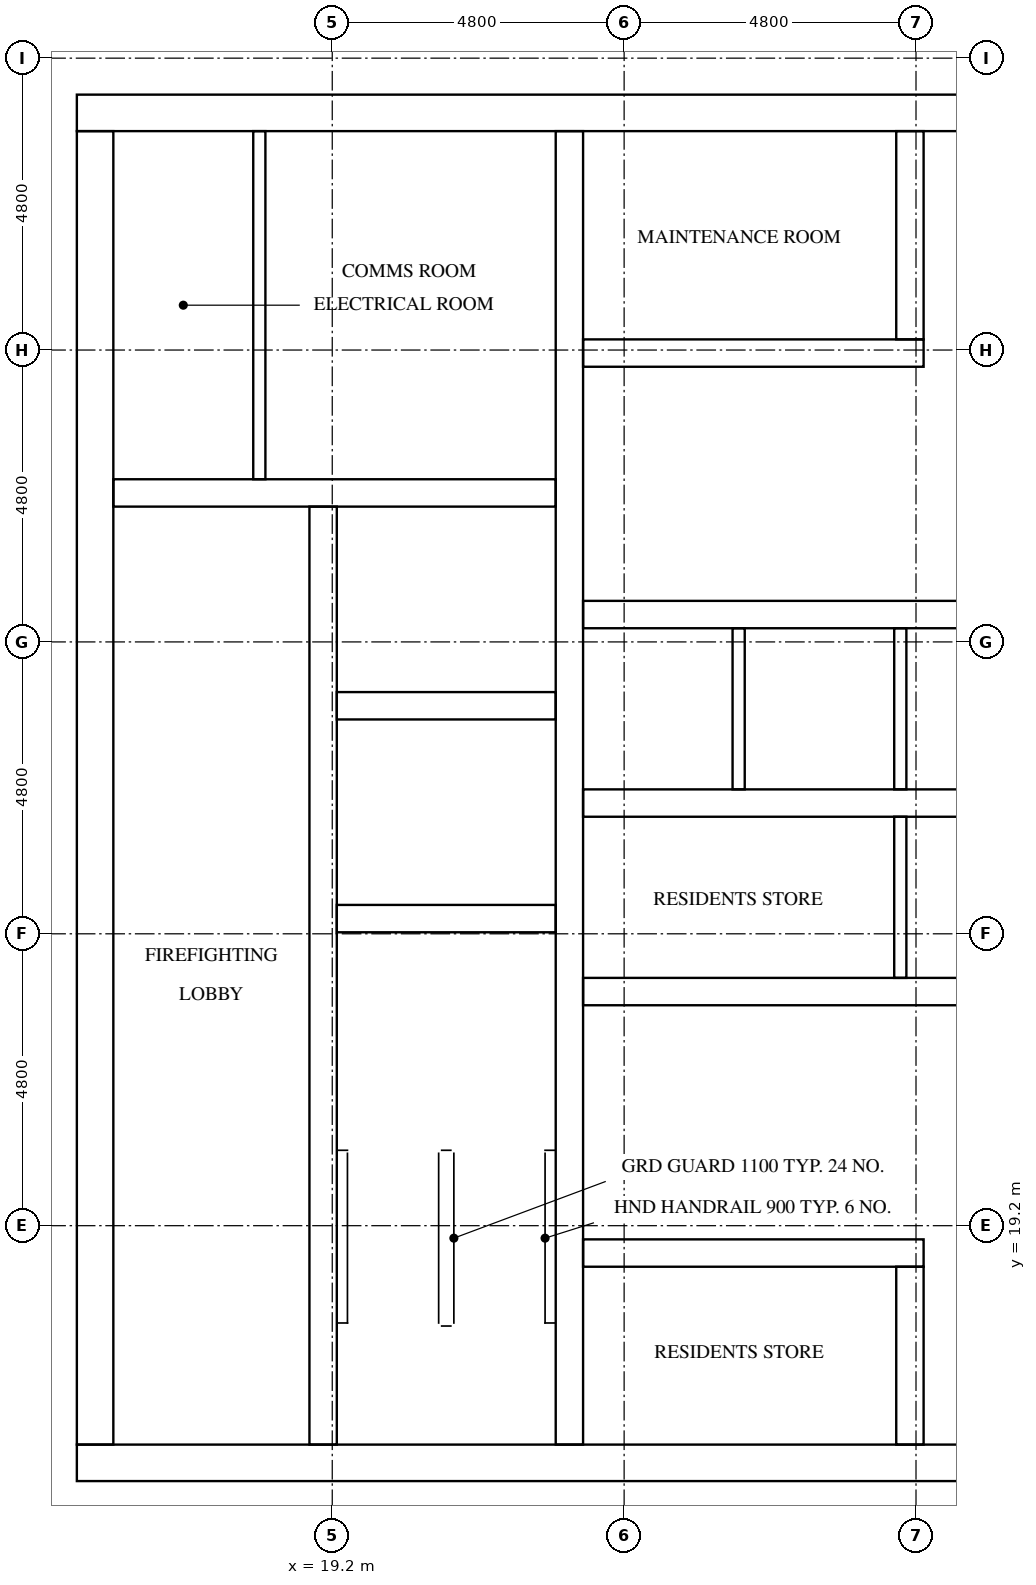
"""IFC4 building model, lengths in metres.
Left out: names, types, materials, properties, quantities, classifications, styles, units other than length and angle.
Written with IfcOpenShell. Run it as: python <this file> out.ifc"""

import sys

from ifc_helpers import new_model, si_unit, direction, frame, frame_2d, origin, place, context, subcontext, project, spatial, rectangle, extrude, element, fill, save


model = new_model("IFC4")
c1 = context("Model", 3, precision=1e-05, world=origin(), true_north=direction((0.0, 1.0)))
c2 = subcontext(c1, "Body", "Model", "MODEL_VIEW")
j1 = project(units=[si_unit("LENGTHUNIT", "METRE"), si_unit("PLANEANGLEUNIT", "RADIAN")], contexts=[c1])
p1 = place(None, origin())
s1 = spatial("IfcSite", under=j1, at=p1, CompositionType="ELEMENT")
p2 = place(p1, origin())
s2 = spatial("IfcBuilding", under=s1, at=p2, CompositionType="ELEMENT")
p3 = place(p2, frame((0.0, 0.0, 242.2)))
s3 = spatial("IfcBuildingStorey", under=s2, at=p3, CompositionType="ELEMENT", Elevation=242.2)
p4 = place(p3, frame((15.0, 15.3, 0.0), z_axis=(0.0, 0.0, 1.0), x_axis=(1.0, 0.0, 0.0)))
e1 = element("IfcWall", 1, at=p4, inside=s3, PredefinedType="SHEAR", context=c2, shape_type="SweptSolid", body=[
    extrude(rectangle(XDim=32.4, YDim=0.6, at=frame_2d((16.2, 0.0))), origin(), (0.0, 0.0, 1.0), 3.2),
])
p5 = place(p4, frame((15.3, 0.0, 0.0)))
e2 = element("IfcOpeningElement", 2, at=p5, cuts=e1, PredefinedType="OPENING", context=c2, shape_type="SweptSolid", body=[
    extrude(rectangle(XDim=1.8, YDim=2.1, at=frame_2d((0.9, 1.05))), frame((0.0, 0.31, 0.0), z_axis=(0.0, -1.0, 0.0), x_axis=(1.0, 0.0, 0.0)), (0.0, 0.0, 1.0), 0.62),
])
p6 = place(p3, frame((15.0, 37.5, 0.0), z_axis=(0.0, 0.0, 1.0), x_axis=(1.0, 0.0, 0.0)))
e3 = element("IfcWall", 3, at=p6, inside=s3, PredefinedType="SHEAR", context=c2, shape_type="SweptSolid", body=[
    extrude(rectangle(XDim=32.4, YDim=0.6, at=frame_2d((16.2, 0.0))), origin(), (0.0, 0.0, 1.0), 3.2),
])
p7 = place(p6, frame((15.3, 0.0, 0.0)))
e4 = element("IfcOpeningElement", 4, at=p7, cuts=e3, PredefinedType="OPENING", context=c2, shape_type="SweptSolid", body=[
    extrude(rectangle(XDim=1.8, YDim=2.1, at=frame_2d((0.9, 1.05))), frame((0.0, 0.31, 0.0), z_axis=(0.0, -1.0, 0.0), x_axis=(1.0, 0.0, 0.0)), (0.0, 0.0, 1.0), 0.62),
])
p8 = place(p6, frame((1.25, 0.0, 0.0)))
e5 = element("IfcOpeningElement", 5, at=p8, cuts=e3, PredefinedType="OPENING", context=c2, shape_type="SweptSolid", body=[
    extrude(rectangle(XDim=1.0, YDim=2.1, at=frame_2d((0.5, 1.05))), frame((0.0, 0.31, 0.0), z_axis=(0.0, -1.0, 0.0), x_axis=(1.0, 0.0, 0.0)), (0.0, 0.0, 1.0), 0.62),
])
p9 = place(p6, frame((4.988, 0.0, 0.0)))
e6 = element("IfcOpeningElement", 6, at=p9, cuts=e3, PredefinedType="OPENING", context=c2, shape_type="SweptSolid", body=[
    extrude(rectangle(XDim=1.0, YDim=2.1, at=frame_2d((0.5, 1.05))), frame((0.0, 0.31, 0.0), z_axis=(0.0, -1.0, 0.0), x_axis=(1.0, 0.0, 0.0)), (0.0, 0.0, 1.0), 0.62),
])
p10 = place(p3, frame((15.3, 15.6, 0.0), z_axis=(0.0, 0.0, 1.0), x_axis=(0.0, 1.0, 0.0)))
e7 = element("IfcWall", 7, at=p10, inside=s3, PredefinedType="SHEAR", context=c2, shape_type="SweptSolid", body=[
    extrude(rectangle(XDim=21.6, YDim=0.6, at=frame_2d((10.8, 0.0))), origin(), (0.0, 0.0, 1.0), 3.2),
])
p11 = place(p10, frame((5.16, 0.0, 0.0)))
e8 = element("IfcOpeningElement", 8, at=p11, cuts=e7, PredefinedType="OPENING", context=c2, shape_type="SweptSolid", body=[
    extrude(rectangle(XDim=1.2, YDim=2.1, at=frame_2d((0.6, 1.05))), frame((0.0, 0.31, 0.0), z_axis=(0.0, -1.0, 0.0), x_axis=(1.0, 0.0, 0.0)), (0.0, 0.0, 1.0), 0.62),
])
p12 = place(p3, frame((19.05, 15.6, 0.0), z_axis=(0.0, 0.0, 1.0), x_axis=(0.0, 1.0, 0.0)))
e9 = element("IfcWall", 9, at=p12, inside=s3, PredefinedType="SHEAR", context=c2, shape_type="SweptSolid", body=[
    extrude(rectangle(XDim=15.425, YDim=0.45, at=frame_2d((7.712, 0.0))), origin(), (0.0, 0.0, 1.0), 3.2),
])
p13 = place(p12, frame((9.85, 0.0, 0.0)))
e10 = element("IfcOpeningElement", 10, at=p13, cuts=e9, PredefinedType="OPENING", context=c2, shape_type="SweptSolid", body=[
    extrude(rectangle(XDim=1.1, YDim=2.1, at=frame_2d((0.55, 1.05))), frame((0.0, 0.235, 0.0), z_axis=(0.0, -1.0, 0.0), x_axis=(1.0, 0.0, 0.0)), (0.0, 0.0, 1.0), 0.47),
])
p14 = place(p12, frame((13.35, 0.0, 0.0)))
e11 = element("IfcOpeningElement", 11, at=p14, cuts=e9, PredefinedType="OPENING", context=c2, shape_type="SweptSolid", body=[
    extrude(rectangle(XDim=1.1, YDim=2.1, at=frame_2d((0.55, 1.05))), frame((0.0, 0.235, 0.0), z_axis=(0.0, -1.0, 0.0), x_axis=(1.0, 0.0, 0.0)), (0.0, 0.0, 1.0), 0.47),
])
p15 = place(p12, frame((0.6, 0.0, 0.0)))
e12 = element("IfcOpeningElement", 12, at=p15, cuts=e9, PredefinedType="OPENING", context=c2, shape_type="SweptSolid", body=[
    extrude(rectangle(XDim=1.2, YDim=2.1, at=frame_2d((0.6, 1.05))), frame((0.0, 0.235, 0.0), z_axis=(0.0, -1.0, 0.0), x_axis=(1.0, 0.0, 0.0)), (0.0, 0.0, 1.0), 0.47),
])
p16 = place(p3, frame((23.1, 15.6, 0.0), z_axis=(0.0, 0.0, 1.0), x_axis=(0.0, 1.0, 0.0)))
e13 = element("IfcWall", 13, at=p16, inside=s3, PredefinedType="SHEAR", context=c2, shape_type="SweptSolid", body=[
    extrude(rectangle(XDim=21.6, YDim=0.45, at=frame_2d((10.8, 0.0))), origin(), (0.0, 0.0, 1.0), 3.2),
])
for number, where, z_axis, x_axis in (
    (14, (19.275, 24.25, 0.0), (0.0, 0.0, 1.0), (1.0, 0.0, 0.0)),
    (15, (19.275, 27.75, 0.0), (0.0, 0.0, 1.0), (1.0, 0.0, 0.0)),
):
    element("IfcWall", number, at=place(p3, frame(where, z_axis=z_axis, x_axis=x_axis)), inside=s3, PredefinedType="SHEAR", context=c2, shape_type="SweptSolid", body=[
        extrude(rectangle(XDim=3.6, YDim=0.45, at=frame_2d((1.8, 0.0))), origin(), (0.0, 0.0, 1.0), 3.2),
    ])
p17 = place(p3, frame((15.6, 31.25, 0.0), z_axis=(0.0, 0.0, 1.0), x_axis=(1.0, 0.0, 0.0)))
e16 = element("IfcWall", 16, at=p17, inside=s3, PredefinedType="SHEAR", context=c2, shape_type="SweptSolid", body=[
    extrude(rectangle(XDim=7.275, YDim=0.45, at=frame_2d((3.637, 0.0))), origin(), (0.0, 0.0, 1.0), 3.2),
])
p18 = place(p3, frame((23.325, 18.75, 0.0), z_axis=(0.0, 0.0, 1.0), x_axis=(1.0, 0.0, 0.0)))
e17 = element("IfcWall", 17, at=p18, inside=s3, PredefinedType="SHEAR", context=c2, shape_type="SweptSolid", body=[
    extrude(rectangle(XDim=5.6, YDim=0.45, at=frame_2d((2.8, 0.0))), origin(), (0.0, 0.0, 1.0), 3.2),
])
p19 = place(p18, frame((2.075, 0.0, 0.0)))
e18 = element("IfcOpeningElement", 18, at=p19, cuts=e17, PredefinedType="OPENING", context=c2, shape_type="SweptSolid", body=[
    extrude(rectangle(XDim=1.0, YDim=2.1, at=frame_2d((0.5, 1.05))), frame((0.0, 0.235, 0.0), z_axis=(0.0, -1.0, 0.0), x_axis=(1.0, 0.0, 0.0)), (0.0, 0.0, 1.0), 0.47),
])
p20 = place(p3, frame((23.325, 23.05, 0.0), z_axis=(0.0, 0.0, 1.0), x_axis=(1.0, 0.0, 0.0)))
e19 = element("IfcWall", 19, at=p20, inside=s3, PredefinedType="SHEAR", context=c2, shape_type="SweptSolid", body=[
    extrude(rectangle(XDim=15.75, YDim=0.45, at=frame_2d((7.875, 0.0))), origin(), (0.0, 0.0, 1.0), 3.2),
])
p21 = place(p20, frame((2.058, 0.0, 0.0)))
e20 = element("IfcOpeningElement", 20, at=p21, cuts=e19, PredefinedType="OPENING", context=c2, shape_type="SweptSolid", body=[
    extrude(rectangle(XDim=1.0, YDim=2.1, at=frame_2d((0.5, 1.05))), frame((0.0, 0.235, 0.0), z_axis=(0.0, -1.0, 0.0), x_axis=(1.0, 0.0, 0.0)), (0.0, 0.0, 1.0), 0.47),
])
p22 = place(p20, frame((12.692, 0.0, 0.0)))
e21 = element("IfcOpeningElement", 21, at=p22, cuts=e19, PredefinedType="OPENING", context=c2, shape_type="SweptSolid", body=[
    extrude(rectangle(XDim=1.0, YDim=2.1, at=frame_2d((0.5, 1.05))), frame((0.0, 0.235, 0.0), z_axis=(0.0, -1.0, 0.0), x_axis=(1.0, 0.0, 0.0)), (0.0, 0.0, 1.0), 0.47),
])
p23 = place(p3, frame((23.325, 26.15, 0.0), z_axis=(0.0, 0.0, 1.0), x_axis=(1.0, 0.0, 0.0)))
e22 = element("IfcWall", 22, at=p23, inside=s3, PredefinedType="SHEAR", context=c2, shape_type="SweptSolid", body=[
    extrude(rectangle(XDim=15.75, YDim=0.45, at=frame_2d((7.875, 0.0))), origin(), (0.0, 0.0, 1.0), 3.2),
])
p24 = place(p3, frame((23.325, 29.25, 0.0), z_axis=(0.0, 0.0, 1.0), x_axis=(1.0, 0.0, 0.0)))
e23 = element("IfcWall", 23, at=p24, inside=s3, PredefinedType="SHEAR", context=c2, shape_type="SweptSolid", body=[
    extrude(rectangle(XDim=15.75, YDim=0.45, at=frame_2d((7.875, 0.0))), origin(), (0.0, 0.0, 1.0), 3.2),
])
p25 = place(p24, frame((0.679, 0.0, 0.0)))
e24 = element("IfcOpeningElement", 24, at=p25, cuts=e23, PredefinedType="OPENING", context=c2, shape_type="SweptSolid", body=[
    extrude(rectangle(XDim=1.1, YDim=2.1, at=frame_2d((0.55, 1.05))), frame((0.0, 0.235, 0.0), z_axis=(0.0, -1.0, 0.0), x_axis=(1.0, 0.0, 0.0)), (0.0, 0.0, 1.0), 0.47),
])
p26 = place(p24, frame((3.337, 0.0, 0.0)))
e25 = element("IfcOpeningElement", 25, at=p26, cuts=e23, PredefinedType="OPENING", context=c2, shape_type="SweptSolid", body=[
    extrude(rectangle(XDim=1.1, YDim=2.1, at=frame_2d((0.55, 1.05))), frame((0.0, 0.235, 0.0), z_axis=(0.0, -1.0, 0.0), x_axis=(1.0, 0.0, 0.0)), (0.0, 0.0, 1.0), 0.47),
])
p27 = place(p24, frame((5.996, 0.0, 0.0)))
e26 = element("IfcOpeningElement", 26, at=p27, cuts=e23, PredefinedType="OPENING", context=c2, shape_type="SweptSolid", body=[
    extrude(rectangle(XDim=1.1, YDim=2.1, at=frame_2d((0.55, 1.05))), frame((0.0, 0.235, 0.0), z_axis=(0.0, -1.0, 0.0), x_axis=(1.0, 0.0, 0.0)), (0.0, 0.0, 1.0), 0.47),
])
p28 = place(p24, frame((8.654, 0.0, 0.0)))
e27 = element("IfcOpeningElement", 27, at=p28, cuts=e23, PredefinedType="OPENING", context=c2, shape_type="SweptSolid", body=[
    extrude(rectangle(XDim=1.1, YDim=2.1, at=frame_2d((0.55, 1.05))), frame((0.0, 0.235, 0.0), z_axis=(0.0, -1.0, 0.0), x_axis=(1.0, 0.0, 0.0)), (0.0, 0.0, 1.0), 0.47),
])
p29 = place(p24, frame((11.312, 0.0, 0.0)))
e28 = element("IfcOpeningElement", 28, at=p29, cuts=e23, PredefinedType="OPENING", context=c2, shape_type="SweptSolid", body=[
    extrude(rectangle(XDim=1.1, YDim=2.1, at=frame_2d((0.55, 1.05))), frame((0.0, 0.235, 0.0), z_axis=(0.0, -1.0, 0.0), x_axis=(1.0, 0.0, 0.0)), (0.0, 0.0, 1.0), 0.47),
])
p30 = place(p24, frame((13.971, 0.0, 0.0)))
e29 = element("IfcOpeningElement", 29, at=p30, cuts=e23, PredefinedType="OPENING", context=c2, shape_type="SweptSolid", body=[
    extrude(rectangle(XDim=1.1, YDim=2.1, at=frame_2d((0.55, 1.05))), frame((0.0, 0.235, 0.0), z_axis=(0.0, -1.0, 0.0), x_axis=(1.0, 0.0, 0.0)), (0.0, 0.0, 1.0), 0.47),
])
p31 = place(p3, frame((23.325, 33.55, 0.0), z_axis=(0.0, 0.0, 1.0), x_axis=(1.0, 0.0, 0.0)))
e30 = element("IfcWall", 30, at=p31, inside=s3, PredefinedType="SHEAR", context=c2, shape_type="SweptSolid", body=[
    extrude(rectangle(XDim=5.6, YDim=0.45, at=frame_2d((2.8, 0.0))), origin(), (0.0, 0.0, 1.0), 3.2),
])
p32 = place(p31, frame((2.075, 0.0, 0.0)))
e31 = element("IfcOpeningElement", 31, at=p32, cuts=e30, PredefinedType="OPENING", context=c2, shape_type="SweptSolid", body=[
    extrude(rectangle(XDim=1.0, YDim=2.1, at=frame_2d((0.5, 1.05))), frame((0.0, 0.235, 0.0), z_axis=(0.0, -1.0, 0.0), x_axis=(1.0, 0.0, 0.0)), (0.0, 0.0, 1.0), 0.47),
])
p33 = place(p3, frame((28.7, 15.6, 0.0), z_axis=(0.0, 0.0, 1.0), x_axis=(0.0, 1.0, 0.0)))
e32 = element("IfcWall", 32, at=p33, inside=s3, PredefinedType="SHEAR", context=c2, shape_type="SweptSolid", body=[
    extrude(rectangle(XDim=2.925, YDim=0.45, at=frame_2d((1.462, 0.0))), origin(), (0.0, 0.0, 1.0), 3.2),
])
p34 = place(p3, frame((28.7, 33.775, 0.0), z_axis=(0.0, 0.0, 1.0), x_axis=(0.0, 1.0, 0.0)))
e33 = element("IfcWall", 33, at=p34, inside=s3, PredefinedType="SHEAR", context=c2, shape_type="SweptSolid", body=[
    extrude(rectangle(XDim=3.425, YDim=0.45, at=frame_2d((1.712, 0.0))), origin(), (0.0, 0.0, 1.0), 3.2),
])
p35 = place(p3, frame((25.883, 26.375, 0.0), z_axis=(0.0, 0.0, 1.0), x_axis=(0.0, 1.0, 0.0)))
e34 = element("IfcWall", 34, at=p35, inside=s3, PredefinedType="SOLIDWALL", context=c2, shape_type="SweptSolid", body=[
    extrude(rectangle(XDim=2.65, YDim=0.2, at=frame_2d((1.325, 0.0))), origin(), (0.0, 0.0, 1.0), 3.2),
])
p36 = place(p3, frame((28.542, 23.275, 0.0), z_axis=(0.0, 0.0, 1.0), x_axis=(0.0, 1.0, 0.0)))
e35 = element("IfcWall", 35, at=p36, inside=s3, PredefinedType="SOLIDWALL", context=c2, shape_type="SweptSolid", body=[
    extrude(rectangle(XDim=2.65, YDim=0.2, at=frame_2d((1.325, 0.0))), origin(), (0.0, 0.0, 1.0), 3.2),
])
p37 = place(p3, frame((28.542, 26.375, 0.0), z_axis=(0.0, 0.0, 1.0), x_axis=(0.0, 1.0, 0.0)))
e36 = element("IfcWall", 36, at=p37, inside=s3, PredefinedType="SOLIDWALL", context=c2, shape_type="SweptSolid", body=[
    extrude(rectangle(XDim=2.65, YDim=0.2, at=frame_2d((1.325, 0.0))), origin(), (0.0, 0.0, 1.0), 3.2),
])
p38 = place(p3, frame((18.001, 31.475, 0.0), z_axis=(0.0, 0.0, 1.0), x_axis=(0.0, 1.0, 0.0)))
e37 = element("IfcWall", 37, at=p38, inside=s3, PredefinedType="PARTITIONING", context=c2, shape_type="SweptSolid", body=[
    extrude(rectangle(XDim=5.725, YDim=0.2, at=frame_2d((2.862, 0.0))), origin(), (0.0, 0.0, 1.0), 3.2),
])
p39 = place(p25, origin())
e38 = element("IfcDoor", 38, at=p39, inside=s3, OperationType="DOUBLE_DOOR_SLIDING", PredefinedType="DOOR", context=c2, shape_type="SweptSolid", body=[
    extrude(rectangle(XDim=1.1, YDim=2.1, at=frame_2d((0.55, 1.05))), frame((0.0, 0.025, 0.0), z_axis=(0.0, -1.0, 0.0), x_axis=(1.0, 0.0, 0.0)), (0.0, 0.0, 1.0), 0.05),
])
fill(e24, e38)
p40 = place(p26, origin())
e39 = element("IfcDoor", 39, at=p40, inside=s3, OperationType="DOUBLE_DOOR_SLIDING", PredefinedType="DOOR", context=c2, shape_type="SweptSolid", body=[
    extrude(rectangle(XDim=1.1, YDim=2.1, at=frame_2d((0.55, 1.05))), frame((0.0, 0.025, 0.0), z_axis=(0.0, -1.0, 0.0), x_axis=(1.0, 0.0, 0.0)), (0.0, 0.0, 1.0), 0.05),
])
fill(e25, e39)
p41 = place(p27, origin())
e40 = element("IfcDoor", 40, at=p41, inside=s3, OperationType="DOUBLE_DOOR_SLIDING", PredefinedType="DOOR", context=c2, shape_type="SweptSolid", body=[
    extrude(rectangle(XDim=1.1, YDim=2.1, at=frame_2d((0.55, 1.05))), frame((0.0, 0.025, 0.0), z_axis=(0.0, -1.0, 0.0), x_axis=(1.0, 0.0, 0.0)), (0.0, 0.0, 1.0), 0.05),
])
fill(e26, e40)
p42 = place(p13, origin())
e41 = element("IfcDoor", 41, at=p42, inside=s3, OperationType="DOUBLE_DOOR_SLIDING", PredefinedType="DOOR", context=c2, shape_type="SweptSolid", body=[
    extrude(rectangle(XDim=1.1, YDim=2.1, at=frame_2d((0.55, 1.05))), frame((0.0, 0.025, 0.0), z_axis=(0.0, -1.0, 0.0), x_axis=(1.0, 0.0, 0.0)), (0.0, 0.0, 1.0), 0.05),
])
fill(e10, e41)
p43 = place(p14, origin())
e42 = element("IfcDoor", 42, at=p43, inside=s3, OperationType="DOUBLE_DOOR_SLIDING", PredefinedType="DOOR", context=c2, shape_type="SweptSolid", body=[
    extrude(rectangle(XDim=1.1, YDim=2.1, at=frame_2d((0.55, 1.05))), frame((0.0, 0.025, 0.0), z_axis=(0.0, -1.0, 0.0), x_axis=(1.0, 0.0, 0.0)), (0.0, 0.0, 1.0), 0.05),
])
fill(e11, e42)
p44 = place(p15, frame((1.2, 0.0, 0.0), z_axis=(0.0, 0.0, 1.0), x_axis=(-1.0, 0.0, 0.0)))
e43 = element("IfcDoor", 43, at=p44, inside=s3, OperationType="SINGLE_SWING_LEFT", PredefinedType="DOOR", context=c2, shape_type="SweptSolid", body=[
    extrude(rectangle(XDim=1.2, YDim=2.1, at=frame_2d((0.6, 1.05))), frame((0.0, 0.025, 0.0), z_axis=(0.0, -1.0, 0.0), x_axis=(1.0, 0.0, 0.0)), (0.0, 0.0, 1.0), 0.05),
])
fill(e12, e43)
p45 = place(p11, frame((1.2, 0.0, 0.0), z_axis=(0.0, 0.0, 1.0), x_axis=(-1.0, 0.0, 0.0)))
e44 = element("IfcDoor", 44, at=p45, inside=s3, OperationType="SINGLE_SWING_RIGHT", PredefinedType="DOOR", context=c2, shape_type="SweptSolid", body=[
    extrude(rectangle(XDim=1.2, YDim=2.1, at=frame_2d((0.6, 1.05))), frame((0.0, 0.025, 0.0), z_axis=(0.0, -1.0, 0.0), x_axis=(1.0, 0.0, 0.0)), (0.0, 0.0, 1.0), 0.05),
])
fill(e8, e44)
p46 = place(p8, origin())
e45 = element("IfcDoor", 45, at=p46, inside=s3, OperationType="SINGLE_SWING_RIGHT", PredefinedType="DOOR", context=c2, shape_type="SweptSolid", body=[
    extrude(rectangle(XDim=1.0, YDim=2.1, at=frame_2d((0.5, 1.05))), frame((0.0, 0.025, 0.0), z_axis=(0.0, -1.0, 0.0), x_axis=(1.0, 0.0, 0.0)), (0.0, 0.0, 1.0), 0.05),
])
fill(e5, e45)
p47 = place(p9, origin())
e46 = element("IfcDoor", 46, at=p47, inside=s3, OperationType="SINGLE_SWING_LEFT", PredefinedType="DOOR", context=c2, shape_type="SweptSolid", body=[
    extrude(rectangle(XDim=1.0, YDim=2.1, at=frame_2d((0.5, 1.05))), frame((0.0, 0.025, 0.0), z_axis=(0.0, -1.0, 0.0), x_axis=(1.0, 0.0, 0.0)), (0.0, 0.0, 1.0), 0.05),
])
fill(e6, e46)
p48 = place(p21, frame((1.0, 0.0, 0.0), z_axis=(0.0, 0.0, 1.0), x_axis=(-1.0, 0.0, 0.0)))
e47 = element("IfcDoor", 47, at=p48, inside=s3, OperationType="SINGLE_SWING_RIGHT", PredefinedType="DOOR", context=c2, shape_type="SweptSolid", body=[
    extrude(rectangle(XDim=1.0, YDim=2.1, at=frame_2d((0.5, 1.05))), frame((0.0, 0.025, 0.0), z_axis=(0.0, -1.0, 0.0), x_axis=(1.0, 0.0, 0.0)), (0.0, 0.0, 1.0), 0.05),
])
fill(e20, e47)
p49 = place(p19, origin())
e48 = element("IfcDoor", 48, at=p49, inside=s3, OperationType="SINGLE_SWING_RIGHT", PredefinedType="DOOR", context=c2, shape_type="SweptSolid", body=[
    extrude(rectangle(XDim=1.0, YDim=2.1, at=frame_2d((0.5, 1.05))), frame((0.0, 0.025, 0.0), z_axis=(0.0, -1.0, 0.0), x_axis=(1.0, 0.0, 0.0)), (0.0, 0.0, 1.0), 0.05),
])
fill(e18, e48)
p50 = place(p32, frame((1.0, 0.0, 0.0), z_axis=(0.0, 0.0, 1.0), x_axis=(-1.0, 0.0, 0.0)))
e49 = element("IfcDoor", 49, at=p50, inside=s3, OperationType="SINGLE_SWING_RIGHT", PredefinedType="DOOR", context=c2, shape_type="SweptSolid", body=[
    extrude(rectangle(XDim=1.0, YDim=2.1, at=frame_2d((0.5, 1.05))), frame((0.0, 0.025, 0.0), z_axis=(0.0, -1.0, 0.0), x_axis=(1.0, 0.0, 0.0)), (0.0, 0.0, 1.0), 0.05),
])
fill(e31, e49)
save(model, sys.argv[1])
